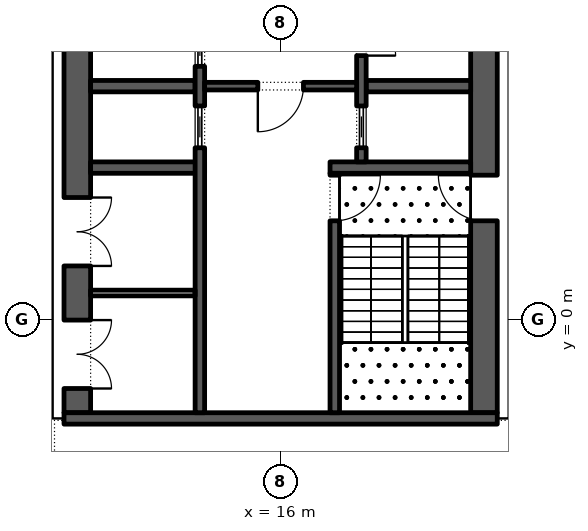
"""IFC4 building model, lengths in metres.
Left out: names, types, materials, properties, quantities, classifications, styles, units other than length and angle.
Written with IfcOpenShell. Run it as: python <this file> out.ifc"""

import sys

from ifc_helpers import new_model, si_unit, direction, frame, frame_2d, origin, place, context, subcontext, project, spatial, rectangle, extrude, element, fill, save


model = new_model("IFC4")
c1 = context("Model", 3, precision=1e-05, world=origin(), true_north=direction((0.0, 1.0)))
c2 = subcontext(c1, "Body", "Model", "MODEL_VIEW")
j1 = project(units=[si_unit("LENGTHUNIT", "METRE"), si_unit("PLANEANGLEUNIT", "RADIAN")], contexts=[c1])
p1 = place(None, origin())
s1 = spatial("IfcSite", under=j1, at=p1, CompositionType="ELEMENT")
p2 = place(p1, origin())
s2 = spatial("IfcBuilding", under=s1, at=p2, CompositionType="ELEMENT")
p3 = place(p2, frame((0.0, 0.0, 226.2)))
s3 = spatial("IfcBuildingStorey", under=s2, at=p3, CompositionType="ELEMENT", Elevation=226.2)
p4 = place(p3, frame((21.35, -2.45, 0.0), z_axis=(0.0, 0.0, 1.0), x_axis=(0.0, 1.0, 0.0)))
e1 = element("IfcWall", 1, at=p4, inside=s3, PredefinedType="SHEAR", context=c2, shape_type="SweptSolid", body=[
    extrude(rectangle(XDim=27.9, YDim=0.7, at=frame_2d((13.95, 0.0))), origin(), (0.0, 0.0, 1.0), 10.35),
])
p5 = place(p4, frame((5.05, 0.0, 0.0)))
e2 = element("IfcOpeningElement", 2, at=p5, cuts=e1, PredefinedType="OPENING", context=c2, shape_type="SweptSolid", body=[
    extrude(rectangle(XDim=1.2, YDim=2.1, at=frame_2d((0.6, 1.05))), frame((0.0, 0.36, 0.0), z_axis=(0.0, -1.0, 0.0), x_axis=(1.0, 0.0, 0.0)), (0.0, 0.0, 1.0), 0.72),
])
p6 = place(p4, frame((21.65, 0.0, 0.0)))
e3 = element("IfcOpeningElement", 3, at=p6, cuts=e1, PredefinedType="OPENING", context=c2, shape_type="SweptSolid", body=[
    extrude(rectangle(XDim=1.2, YDim=2.1, at=frame_2d((0.6, 1.05))), frame((0.0, 0.36, 0.0), z_axis=(0.0, -1.0, 0.0), x_axis=(1.0, 0.0, 0.0)), (0.0, 0.0, 1.0), 0.72),
])
p7 = place(p3, frame((10.65, -2.45, 0.0), z_axis=(0.0, 0.0, 1.0), x_axis=(0.0, 1.0, 0.0)))
e4 = element("IfcWall", 4, at=p7, inside=s3, PredefinedType="SHEAR", context=c2, shape_type="SweptSolid", body=[
    extrude(rectangle(XDim=27.9, YDim=0.7, at=frame_2d((13.95, 0.0))), origin(), (0.0, 0.0, 1.0), 10.35),
])
p8 = place(p7, frame((23.65, 0.0, 0.0)))
e5 = element("IfcOpeningElement", 5, at=p8, cuts=e4, PredefinedType="OPENING", context=c2, shape_type="SweptSolid", body=[
    extrude(rectangle(XDim=2.4, YDim=2.1, at=frame_2d((1.2, 1.05))), frame((0.0, 0.36, 0.0), z_axis=(0.0, -1.0, 0.0), x_axis=(1.0, 0.0, 0.0)), (0.0, 0.0, 1.0), 0.72),
])
p9 = place(p7, frame((0.637, 0.0, 0.0)))
e6 = element("IfcOpeningElement", 6, at=p9, cuts=e4, PredefinedType="OPENING", context=c2, shape_type="SweptSolid", body=[
    extrude(rectangle(XDim=1.8, YDim=2.4, at=frame_2d((0.9, 1.2))), frame((0.0, 0.36, 0.0), z_axis=(0.0, -1.0, 0.0), x_axis=(1.0, 0.0, 0.0)), (0.0, 0.0, 1.0), 0.72),
])
p10 = place(p7, frame((3.863, 0.0, 0.0)))
e7 = element("IfcOpeningElement", 7, at=p10, cuts=e4, PredefinedType="OPENING", context=c2, shape_type="SweptSolid", body=[
    extrude(rectangle(XDim=1.8, YDim=2.4, at=frame_2d((0.9, 1.2))), frame((0.0, 0.36, 0.0), z_axis=(0.0, -1.0, 0.0), x_axis=(1.0, 0.0, 0.0)), (0.0, 0.0, 1.0), 0.72),
])
p11 = place(p3, frame((10.3, -2.6, 0.0), z_axis=(0.0, 0.0, 1.0), x_axis=(1.0, 0.0, 0.0)))
e8 = element("IfcWall", 8, at=p11, inside=s3, PredefinedType="SHEAR", context=c2, shape_type="SweptSolid", body=[
    extrude(rectangle(XDim=11.4, YDim=0.3, at=frame_2d((5.7, 0.0))), origin(), (0.0, 0.0, 1.0), 10.35),
])
p12 = place(p3, frame((17.3, 4.0, 0.0), z_axis=(0.0, 0.0, 1.0), x_axis=(1.0, 0.0, 0.0)))
e9 = element("IfcWall", 9, at=p12, inside=s3, PredefinedType="SHEAR", context=c2, shape_type="SweptSolid", body=[
    extrude(rectangle(XDim=3.7, YDim=0.3, at=frame_2d((1.85, 0.0))), origin(), (0.0, 0.0, 1.0), 10.35),
])
p13 = place(p3, frame((17.425, -2.45, 0.0), z_axis=(0.0, 0.0, 1.0), x_axis=(0.0, 1.0, 0.0)))
e10 = element("IfcWall", 10, at=p13, inside=s3, PredefinedType="SHEAR", context=c2, shape_type="SweptSolid", body=[
    extrude(rectangle(XDim=6.3, YDim=0.25, at=frame_2d((3.15, 0.0))), origin(), (0.0, 0.0, 1.0), 10.35),
])
p14 = place(p13, frame((5.05, 0.0, 0.0)))
e11 = element("IfcOpeningElement", 11, at=p14, cuts=e10, PredefinedType="OPENING", context=c2, shape_type="SweptSolid", body=[
    extrude(rectangle(XDim=1.2, YDim=2.1, at=frame_2d((0.6, 1.05))), frame((0.0, 0.135, 0.0), z_axis=(0.0, -1.0, 0.0), x_axis=(1.0, 0.0, 0.0)), (0.0, 0.0, 1.0), 0.27),
])
p15 = place(p3, frame((18.25, 6.143, 0.0), z_axis=(0.0, 0.0, 1.0), x_axis=(1.0, 0.0, 0.0)))
e12 = element("IfcWall", 12, at=p15, inside=s3, PredefinedType="SHEAR", context=c2, shape_type="SweptSolid", body=[
    extrude(rectangle(XDim=2.75, YDim=0.3, at=frame_2d((1.375, 0.0))), origin(), (0.0, 0.0, 1.0), 10.35),
])
p16 = place(p3, frame((18.125, 4.15, 0.0), z_axis=(0.0, 0.0, 1.0), x_axis=(0.0, 1.0, 0.0)))
e13 = element("IfcWall", 13, at=p16, inside=s3, PredefinedType="SHEAR", context=c2, shape_type="SweptSolid", body=[
    extrude(rectangle(XDim=14.7, YDim=0.25, at=frame_2d((7.35, 0.0))), origin(), (0.0, 0.0, 1.0), 10.35),
])
p17 = place(p16, frame((2.796, 0.0, 0.0)))
e14 = element("IfcOpeningElement", 14, at=p17, cuts=e13, PredefinedType="OPENING", context=c2, shape_type="SweptSolid", body=[
    extrude(rectangle(XDim=1.8, YDim=2.4, at=frame_2d((0.9, 1.2))), frame((0.0, 0.135, 0.0), z_axis=(0.0, -1.0, 0.0), x_axis=(1.0, 0.0, 0.0)), (0.0, 0.0, 1.0), 0.27),
])
p18 = place(p16, frame((8.004, 0.0, 0.0)))
e15 = element("IfcOpeningElement", 15, at=p18, cuts=e13, PredefinedType="OPENING", context=c2, shape_type="SweptSolid", body=[
    extrude(rectangle(XDim=1.8, YDim=2.4, at=frame_2d((0.9, 1.2))), frame((0.0, 0.135, 0.0), z_axis=(0.0, -1.0, 0.0), x_axis=(1.0, 0.0, 0.0)), (0.0, 0.0, 1.0), 0.27),
])
p19 = place(p16, frame((0.371, 0.0, 0.0)))
e16 = element("IfcOpeningElement", 16, at=p19, cuts=e13, PredefinedType="OPENING", context=c2, shape_type="SweptSolid", body=[
    extrude(rectangle(XDim=1.1, YDim=2.1, at=frame_2d((0.55, 1.05))), frame((0.0, 0.135, 0.0), z_axis=(0.0, -1.0, 0.0), x_axis=(1.0, 0.0, 0.0)), (0.0, 0.0, 1.0), 0.27),
])
p20 = place(p16, frame((13.229, 0.0, 0.0)))
e17 = element("IfcOpeningElement", 17, at=p20, cuts=e13, PredefinedType="OPENING", context=c2, shape_type="SweptSolid", body=[
    extrude(rectangle(XDim=1.1, YDim=2.1, at=frame_2d((0.55, 1.05))), frame((0.0, 0.135, 0.0), z_axis=(0.0, -1.0, 0.0), x_axis=(1.0, 0.0, 0.0)), (0.0, 0.0, 1.0), 0.27),
])
p21 = place(p3, frame((11.0, 4.0, 0.0), z_axis=(0.0, 0.0, 1.0), x_axis=(1.0, 0.0, 0.0)))
e18 = element("IfcWall", 18, at=p21, inside=s3, PredefinedType="SHEAR", context=c2, shape_type="SweptSolid", body=[
    extrude(rectangle(XDim=3.0, YDim=0.3, at=frame_2d((1.5, 0.0))), origin(), (0.0, 0.0, 1.0), 10.35),
])
p22 = place(p3, frame((11.0, 6.143, 0.0), z_axis=(0.0, 0.0, 1.0), x_axis=(1.0, 0.0, 0.0)))
e19 = element("IfcWall", 19, at=p22, inside=s3, PredefinedType="SHEAR", context=c2, shape_type="SweptSolid", body=[
    extrude(rectangle(XDim=2.75, YDim=0.3, at=frame_2d((1.375, 0.0))), origin(), (0.0, 0.0, 1.0), 10.35),
])
p23 = place(p3, frame((13.875, -2.45, 0.0), z_axis=(0.0, 0.0, 1.0), x_axis=(0.0, 1.0, 0.0)))
e20 = element("IfcWall", 20, at=p23, inside=s3, PredefinedType="SHEAR", context=c2, shape_type="SweptSolid", body=[
    extrude(rectangle(XDim=21.3, YDim=0.25, at=frame_2d((10.65, 0.0))), origin(), (0.0, 0.0, 1.0), 10.35),
])
p24 = place(p23, frame((15.811, 0.0, 0.0)))
e21 = element("IfcOpeningElement", 21, at=p24, cuts=e20, PredefinedType="OPENING", context=c2, shape_type="SweptSolid", body=[
    extrude(rectangle(XDim=1.8, YDim=2.4, at=frame_2d((0.9, 1.2))), frame((0.0, 0.135, 0.0), z_axis=(0.0, -1.0, 0.0), x_axis=(1.0, 0.0, 0.0)), (0.0, 0.0, 1.0), 0.27),
])
p25 = place(p23, frame((18.875, 0.0, 0.0)))
e22 = element("IfcOpeningElement", 22, at=p25, cuts=e20, PredefinedType="OPENING", context=c2, shape_type="SweptSolid", body=[
    extrude(rectangle(XDim=1.8, YDim=2.4, at=frame_2d((0.9, 1.2))), frame((0.0, 0.135, 0.0), z_axis=(0.0, -1.0, 0.0), x_axis=(1.0, 0.0, 0.0)), (0.0, 0.0, 1.0), 0.27),
])
p26 = place(p23, frame((6.971, 0.0, 0.0)))
e23 = element("IfcOpeningElement", 23, at=p26, cuts=e20, PredefinedType="OPENING", context=c2, shape_type="SweptSolid", body=[
    extrude(rectangle(XDim=1.1, YDim=2.1, at=frame_2d((0.55, 1.05))), frame((0.0, 0.135, 0.0), z_axis=(0.0, -1.0, 0.0), x_axis=(1.0, 0.0, 0.0)), (0.0, 0.0, 1.0), 0.27),
])
p27 = place(p23, frame((9.114, 0.0, 0.0)))
e24 = element("IfcOpeningElement", 24, at=p27, cuts=e20, PredefinedType="OPENING", context=c2, shape_type="SweptSolid", body=[
    extrude(rectangle(XDim=1.1, YDim=2.1, at=frame_2d((0.55, 1.05))), frame((0.0, 0.135, 0.0), z_axis=(0.0, -1.0, 0.0), x_axis=(1.0, 0.0, 0.0)), (0.0, 0.0, 1.0), 0.27),
])
p28 = place(p23, frame((11.257, 0.0, 0.0)))
e25 = element("IfcOpeningElement", 25, at=p28, cuts=e20, PredefinedType="OPENING", context=c2, shape_type="SweptSolid", body=[
    extrude(rectangle(XDim=1.1, YDim=2.1, at=frame_2d((0.55, 1.05))), frame((0.0, 0.135, 0.0), z_axis=(0.0, -1.0, 0.0), x_axis=(1.0, 0.0, 0.0)), (0.0, 0.0, 1.0), 0.27),
])
p29 = place(p23, frame((13.4, 0.0, 0.0)))
e26 = element("IfcOpeningElement", 26, at=p29, cuts=e20, PredefinedType="OPENING", context=c2, shape_type="SweptSolid", body=[
    extrude(rectangle(XDim=1.1, YDim=2.1, at=frame_2d((0.55, 1.05))), frame((0.0, 0.135, 0.0), z_axis=(0.0, -1.0, 0.0), x_axis=(1.0, 0.0, 0.0)), (0.0, 0.0, 1.0), 0.27),
])
p30 = place(p3, frame((14.0, 6.143, 0.0), z_axis=(0.0, 0.0, 1.0), x_axis=(1.0, 0.0, 0.0)))
e27 = element("IfcWall", 27, at=p30, inside=s3, PredefinedType="SHEAR", context=c2, shape_type="SweptSolid", body=[
    extrude(rectangle(XDim=4.0, YDim=0.2, at=frame_2d((2.0, 0.0))), origin(), (0.0, 0.0, 1.0), 10.35),
])
p31 = place(p30, frame((1.4, 0.0, 0.0)))
e28 = element("IfcOpeningElement", 28, at=p31, cuts=e27, PredefinedType="OPENING", context=c2, shape_type="SweptSolid", body=[
    extrude(rectangle(XDim=1.2, YDim=2.1, at=frame_2d((0.6, 1.05))), frame((0.0, 0.11, 0.0), z_axis=(0.0, -1.0, 0.0), x_axis=(1.0, 0.0, 0.0)), (0.0, 0.0, 1.0), 0.22),
])
p32 = place(p3, frame((11.0, 0.7, 0.0), z_axis=(0.0, 0.0, 1.0), x_axis=(1.0, 0.0, 0.0)))
e29 = element("IfcWall", 29, at=p32, inside=s3, PredefinedType="PARTITIONING", context=c2, shape_type="SweptSolid", body=[
    extrude(rectangle(XDim=2.75, YDim=0.15, at=frame_2d((1.375, 0.0))), origin(), (0.0, 0.0, 1.0), 10.35),
])
p33 = place(p17, frame((1.8, -0.2, 0.0), z_axis=(0.0, 0.0, 1.0), x_axis=(-1.0, 0.0, 0.0)))
e30 = element("IfcDoor", 30, at=p33, inside=s3, OperationType="DOUBLE_DOOR_SINGLE_SWING", PredefinedType="DOOR", context=c2, shape_type="SweptSolid", body=[
    extrude(rectangle(XDim=1.8, YDim=2.4, at=frame_2d((0.9, 1.2))), frame((0.0, -0.075, 0.0), z_axis=(0.0, -1.0, 0.0), x_axis=(1.0, 0.0, 0.0)), (0.0, 0.0, 1.0), 0.05),
])
fill(e14, e30)
p34 = place(p19, origin())
e31 = element("IfcDoor", 31, at=p34, inside=s3, OperationType="SLIDING_TO_LEFT", PredefinedType="DOOR", context=c2, shape_type="SweptSolid", body=[
    extrude(rectangle(XDim=1.1, YDim=2.1, at=frame_2d((0.55, 1.05))), frame((0.0, 0.025, 0.0), z_axis=(0.0, -1.0, 0.0), x_axis=(1.0, 0.0, 0.0)), (0.0, 0.0, 1.0), 0.05),
])
fill(e16, e31)
p35 = place(p26, origin())
e32 = element("IfcDoor", 32, at=p35, inside=s3, OperationType="SLIDING_TO_LEFT", PredefinedType="DOOR", context=c2, shape_type="SweptSolid", body=[
    extrude(rectangle(XDim=1.1, YDim=2.1, at=frame_2d((0.55, 1.05))), frame((0.0, 0.025, 0.0), z_axis=(0.0, -1.0, 0.0), x_axis=(1.0, 0.0, 0.0)), (0.0, 0.0, 1.0), 0.05),
])
fill(e23, e32)
p36 = place(p27, origin())
e33 = element("IfcDoor", 33, at=p36, inside=s3, OperationType="SLIDING_TO_LEFT", PredefinedType="DOOR", context=c2, shape_type="SweptSolid", body=[
    extrude(rectangle(XDim=1.1, YDim=2.1, at=frame_2d((0.55, 1.05))), frame((0.0, 0.025, 0.0), z_axis=(0.0, -1.0, 0.0), x_axis=(1.0, 0.0, 0.0)), (0.0, 0.0, 1.0), 0.05),
])
fill(e24, e33)
p37 = place(p31, frame((1.2, 0.0, 0.0), z_axis=(0.0, 0.0, 1.0), x_axis=(-1.0, 0.0, 0.0)))
e34 = element("IfcDoor", 34, at=p37, inside=s3, OperationType="SINGLE_SWING_LEFT", PredefinedType="DOOR", context=c2, shape_type="SweptSolid", body=[
    extrude(rectangle(XDim=1.2, YDim=2.1, at=frame_2d((0.6, 1.05))), frame((0.0, 0.025, 0.0), z_axis=(0.0, -1.0, 0.0), x_axis=(1.0, 0.0, 0.0)), (0.0, 0.0, 1.0), 0.05),
])
fill(e28, e34)
p38 = place(p14, frame((1.2, 0.0, 0.0), z_axis=(0.0, 0.0, 1.0), x_axis=(-1.0, 0.0, 0.0)))
e35 = element("IfcDoor", 35, at=p38, inside=s3, OperationType="SINGLE_SWING_RIGHT", PredefinedType="DOOR", context=c2, shape_type="SweptSolid", body=[
    extrude(rectangle(XDim=1.2, YDim=2.1, at=frame_2d((0.6, 1.05))), frame((0.0, 0.025, 0.0), z_axis=(0.0, -1.0, 0.0), x_axis=(1.0, 0.0, 0.0)), (0.0, 0.0, 1.0), 0.05),
])
fill(e11, e35)
p39 = place(p5, origin())
e36 = element("IfcDoor", 36, at=p39, inside=s3, OperationType="SINGLE_SWING_LEFT", PredefinedType="DOOR", context=c2, shape_type="SweptSolid", body=[
    extrude(rectangle(XDim=1.2, YDim=2.1, at=frame_2d((0.6, 1.05))), frame((0.0, 0.025, 0.0), z_axis=(0.0, -1.0, 0.0), x_axis=(1.0, 0.0, 0.0)), (0.0, 0.0, 1.0), 0.05),
])
fill(e2, e36)
p40 = place(p9, frame((1.8, -0.65, 0.0), z_axis=(0.0, 0.0, 1.0), x_axis=(-1.0, 0.0, 0.0)))
e37 = element("IfcDoor", 37, at=p40, inside=s3, OperationType="DOUBLE_DOOR_SINGLE_SWING", PredefinedType="DOOR", context=c2, shape_type="SweptSolid", body=[
    extrude(rectangle(XDim=1.8, YDim=2.4, at=frame_2d((0.9, 1.2))), frame((0.0, -0.3, 0.0), z_axis=(0.0, -1.0, 0.0), x_axis=(1.0, 0.0, 0.0)), (0.0, 0.0, 1.0), 0.05),
])
fill(e6, e37)
p41 = place(p10, frame((1.8, -0.65, 0.0), z_axis=(0.0, 0.0, 1.0), x_axis=(-1.0, 0.0, 0.0)))
e38 = element("IfcDoor", 38, at=p41, inside=s3, OperationType="DOUBLE_DOOR_SINGLE_SWING", PredefinedType="DOOR", context=c2, shape_type="SweptSolid", body=[
    extrude(rectangle(XDim=1.8, YDim=2.4, at=frame_2d((0.9, 1.2))), frame((0.0, -0.3, 0.0), z_axis=(0.0, -1.0, 0.0), x_axis=(1.0, 0.0, 0.0)), (0.0, 0.0, 1.0), 0.05),
])
fill(e7, e38)
save(model, sys.argv[1])
